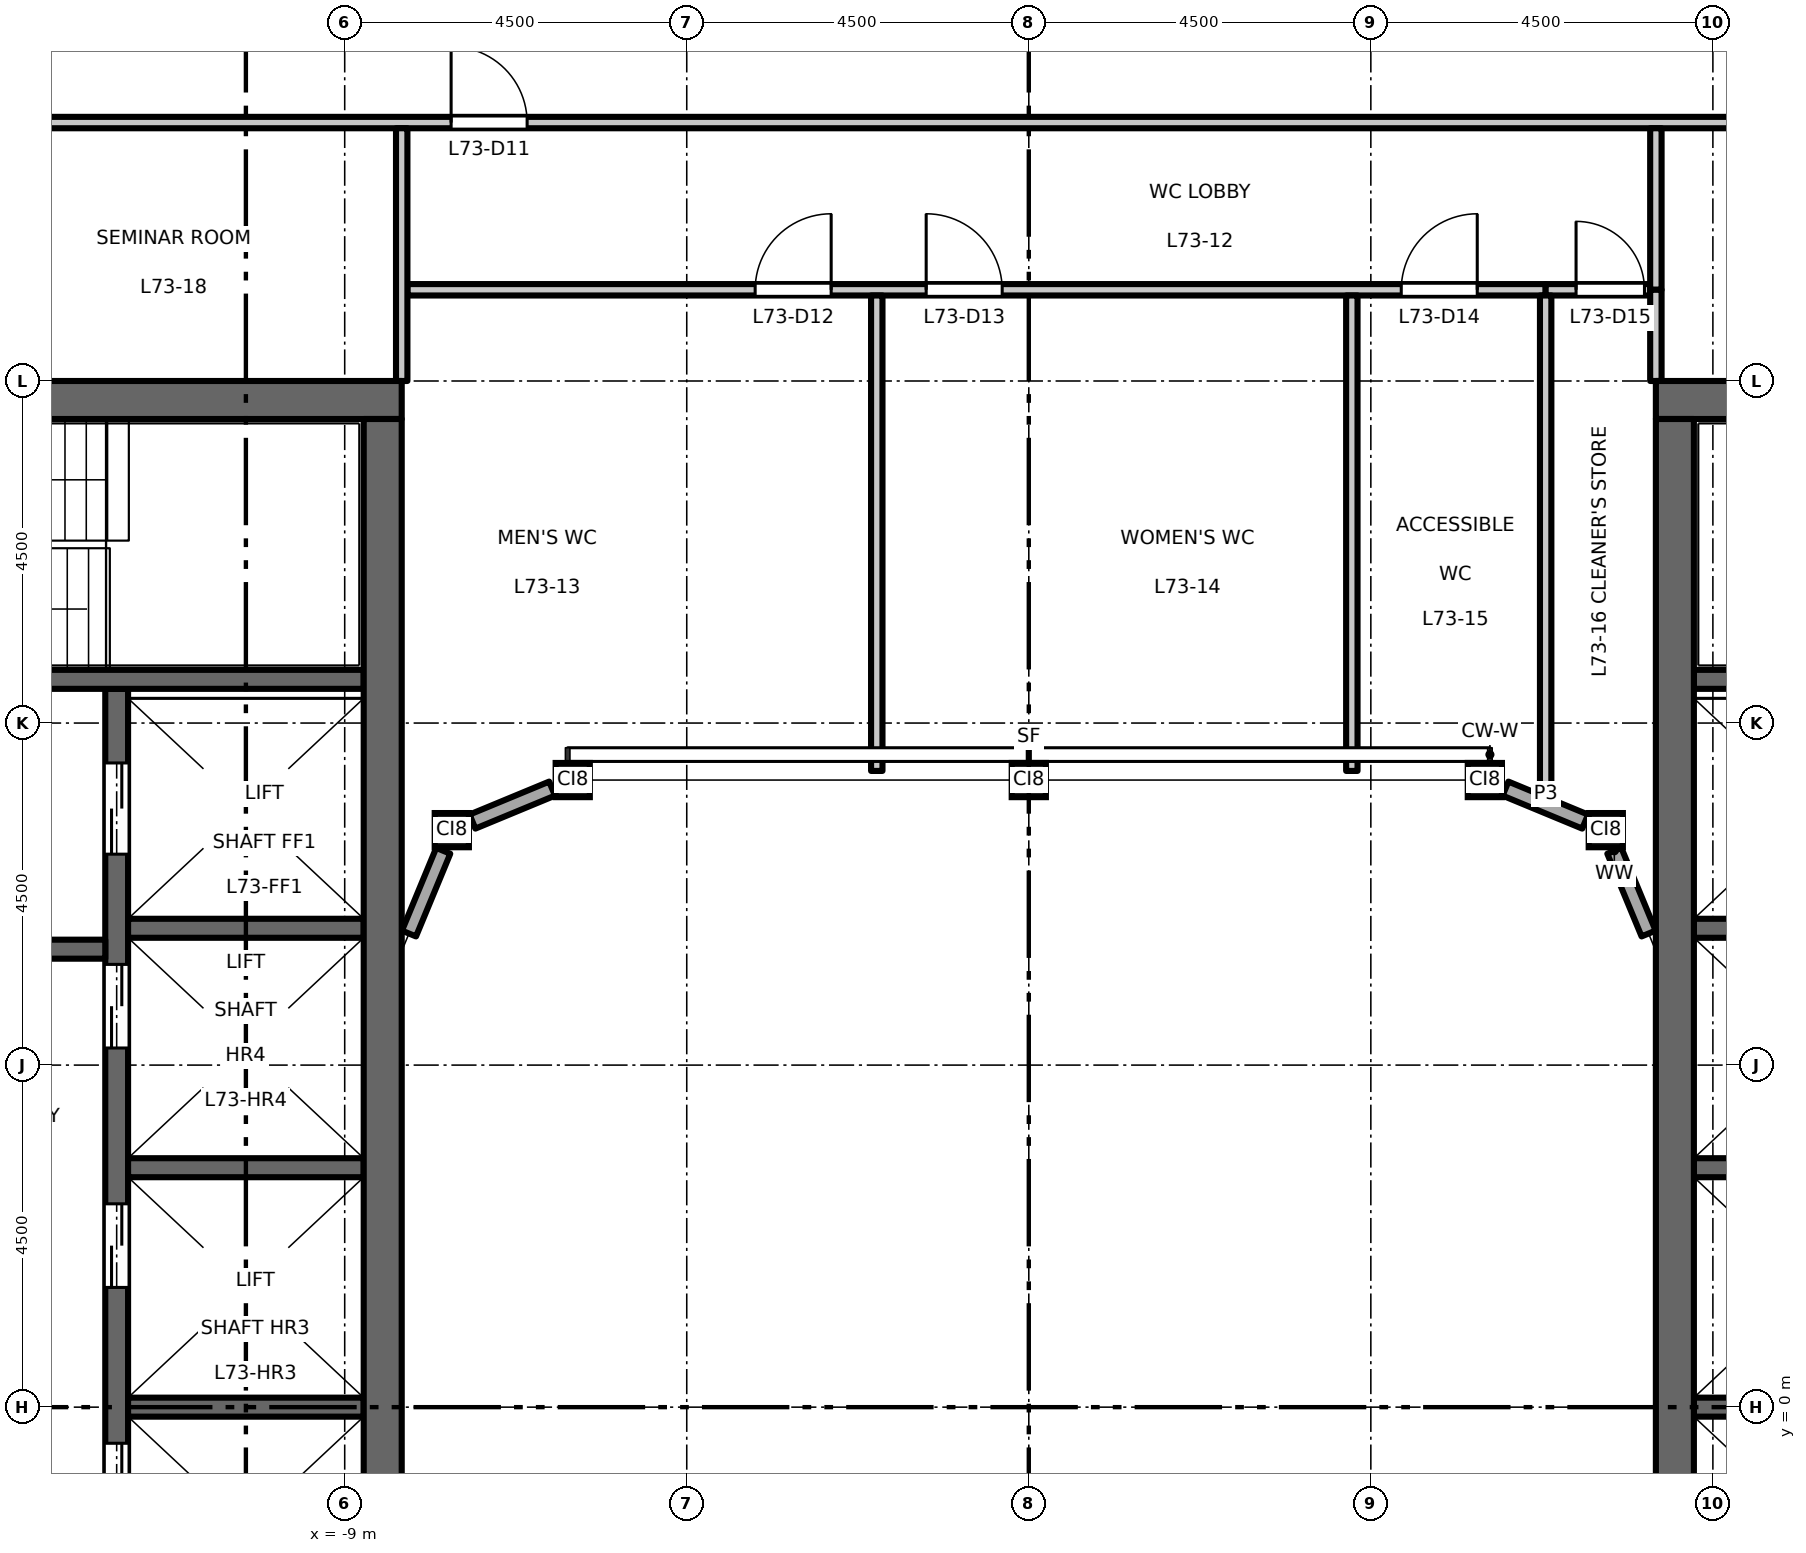
"""IFC4 building model, lengths in metres.
Left out: names, types, materials, properties, quantities, classifications, styles, units other than length and angle.
Written with IfcOpenShell. Run it as: python <this file> out.ifc"""

import sys

from ifc_helpers import new_model, si_unit, direction, frame, frame_2d, origin, origin_2d, place, context, subcontext, project, spatial, rectangle, hollow_rectangle, extrude, element, fill, save


model = new_model("IFC4")
c1 = context("Model", 3, precision=1e-05, world=origin(), true_north=direction((0.0, 1.0)))
c2 = subcontext(c1, "Body", "Model", "MODEL_VIEW")
j1 = project(units=[si_unit("LENGTHUNIT", "METRE"), si_unit("PLANEANGLEUNIT", "RADIAN")], contexts=[c1])
p1 = place(None, origin())
s1 = spatial("IfcSite", under=j1, at=p1, CompositionType="ELEMENT")
p2 = place(p1, origin())
s2 = spatial("IfcBuilding", under=s1, at=p2, CompositionType="ELEMENT")
p3 = place(p2, frame((0.0, 0.0, 339.2)))
s3 = spatial("IfcBuildingStorey", under=s2, at=p3, CompositionType="ELEMENT", Elevation=339.2)
for number, where, z_axis, x_axis in (
    (1, (-7.591, 7.591, 0.0), (0.0, 0.0, 1.0), (1.0, 0.0, 0.0)),
    (2, (-6.0, 8.25, 0.0), (0.0, 0.0, 1.0), (1.0, 0.0, 0.0)),
    (3, (0.0, 8.25, 0.0), (0.0, 0.0, 1.0), (1.0, 0.0, 0.0)),
    (4, (6.0, 8.25, 0.0), (0.0, 0.0, 1.0), (1.0, 0.0, 0.0)),
    (5, (7.591, 7.591, 0.0), (0.0, 0.0, 1.0), (1.0, 0.0, 0.0)),
):
    element("IfcColumn", number, at=place(p3, frame(where, z_axis=z_axis, x_axis=x_axis)), inside=s3, PredefinedType="COLUMN", context=c2, shape_type="SweptSolid", body=[
        extrude(hollow_rectangle(XDim=0.45, YDim=0.45, WallThickness=0.022, at=origin_2d()), origin(), (0.0, 0.0, 1.0), 4.5),
    ])
p4 = place(p3, frame((-12.0, -9.45, 0.0), z_axis=(0.0, 0.0, 1.0), x_axis=(0.0, 1.0, 0.0)))
e6 = element("IfcWall", 6, at=p4, inside=s3, PredefinedType="SHEAR", context=c2, shape_type="SweptSolid", body=[
    extrude(rectangle(XDim=18.9, YDim=0.3, at=frame_2d((9.45, 0.0))), origin(), (0.0, 0.0, 1.0), 4.35),
])
p5 = place(p4, frame((4.725, 0.0, 0.0)))
e7 = element("IfcOpeningElement", 7, at=p5, cuts=e6, PredefinedType="OPENING", context=c2, shape_type="SweptSolid", body=[
    extrude(rectangle(XDim=1.1, YDim=2.1, at=frame_2d((0.55, 1.05))), frame((0.0, 0.16, 0.0), z_axis=(0.0, -1.0, 0.0), x_axis=(1.0, 0.0, 0.0)), (0.0, 0.0, 1.0), 0.32),
])
p6 = place(p4, frame((7.875, 0.0, 0.0)))
e8 = element("IfcOpeningElement", 8, at=p6, cuts=e6, PredefinedType="OPENING", context=c2, shape_type="SweptSolid", body=[
    extrude(rectangle(XDim=1.1, YDim=2.1, at=frame_2d((0.55, 1.05))), frame((0.0, 0.16, 0.0), z_axis=(0.0, -1.0, 0.0), x_axis=(1.0, 0.0, 0.0)), (0.0, 0.0, 1.0), 0.32),
])
p7 = place(p4, frame((11.025, 0.0, 0.0)))
e9 = element("IfcOpeningElement", 9, at=p7, cuts=e6, PredefinedType="OPENING", context=c2, shape_type="SweptSolid", body=[
    extrude(rectangle(XDim=1.1, YDim=2.1, at=frame_2d((0.55, 1.05))), frame((0.0, 0.16, 0.0), z_axis=(0.0, -1.0, 0.0), x_axis=(1.0, 0.0, 0.0)), (0.0, 0.0, 1.0), 0.32),
])
p8 = place(p4, frame((14.175, 0.0, 0.0)))
e10 = element("IfcOpeningElement", 10, at=p8, cuts=e6, PredefinedType="OPENING", context=c2, shape_type="SweptSolid", body=[
    extrude(rectangle(XDim=1.1, YDim=2.1, at=frame_2d((0.55, 1.05))), frame((0.0, 0.16, 0.0), z_axis=(0.0, -1.0, 0.0), x_axis=(1.0, 0.0, 0.0)), (0.0, 0.0, 1.0), 0.32),
])
p9 = place(p4, frame((16.725, 0.0, 0.0)))
e11 = element("IfcOpeningElement", 11, at=p9, cuts=e6, PredefinedType="OPENING", context=c2, shape_type="SweptSolid", body=[
    extrude(rectangle(XDim=1.2, YDim=2.1, at=frame_2d((0.6, 1.05))), frame((0.0, 0.16, 0.0), z_axis=(0.0, -1.0, 0.0), x_axis=(1.0, 0.0, 0.0)), (0.0, 0.0, 1.0), 0.32),
])
p10 = place(p4, frame((0.975, 0.0, 0.0)))
e12 = element("IfcOpeningElement", 12, at=p10, cuts=e6, PredefinedType="OPENING", context=c2, shape_type="SweptSolid", body=[
    extrude(rectangle(XDim=1.2, YDim=2.1, at=frame_2d((0.6, 1.05))), frame((0.0, 0.16, 0.0), z_axis=(0.0, -1.0, 0.0), x_axis=(1.0, 0.0, 0.0)), (0.0, 0.0, 1.0), 0.32),
])
p11 = place(p3, frame((-12.15, 6.025, 0.0), z_axis=(0.0, 0.0, 1.0), x_axis=(-1.0, 0.0, 0.0)))
e13 = element("IfcWall", 13, at=p11, inside=s3, PredefinedType="SHEAR", context=c2, shape_type="SweptSolid", body=[
    extrude(rectangle(XDim=4.6, YDim=0.25, at=frame_2d((2.3, 0.0))), origin(), (0.0, 0.0, 1.0), 4.35),
])
p12 = place(p11, frame((1.8, 0.0, 0.0)))
e14 = element("IfcOpeningElement", 14, at=p12, cuts=e13, PredefinedType="OPENING", context=c2, shape_type="SweptSolid", body=[
    extrude(rectangle(XDim=1.0, YDim=2.1, at=frame_2d((0.5, 1.05))), frame((0.0, 0.135, 0.0), z_axis=(0.0, -1.0, 0.0), x_axis=(1.0, 0.0, 0.0)), (0.0, 0.0, 1.0), 0.27),
])
for number, where, z_axis, x_axis in (
    (15, (-8.75, 0.0, 0.0), (0.0, 0.0, 1.0), (-1.0, 0.0, 0.0)),
    (16, (-8.75, 3.15, 0.0), (0.0, 0.0, 1.0), (-1.0, 0.0, 0.0)),
    (17, (-8.75, 6.3, 0.0), (0.0, 0.0, 1.0), (-1.0, 0.0, 0.0)),
):
    element("IfcWall", number, at=place(p3, frame(where, z_axis=z_axis, x_axis=x_axis)), inside=s3, PredefinedType="SHEAR", context=c2, shape_type="SweptSolid", body=[
        extrude(rectangle(XDim=3.1, YDim=0.25, at=frame_2d((1.55, 0.0))), origin(), (0.0, 0.0, 1.0), 4.35),
    ])
p13 = place(p3, frame((-8.75, 9.575, 0.0), z_axis=(0.0, 0.0, 1.0), x_axis=(-1.0, 0.0, 0.0)))
e18 = element("IfcWall", 18, at=p13, inside=s3, PredefinedType="SHEAR", context=c2, shape_type="SweptSolid", body=[
    extrude(rectangle(XDim=8.0, YDim=0.25, at=frame_2d((4.0, 0.0))), origin(), (0.0, 0.0, 1.0), 4.35),
])
p14 = place(p13, frame((6.65, 0.0, 0.0)))
e19 = element("IfcOpeningElement", 19, at=p14, cuts=e18, PredefinedType="OPENING", context=c2, shape_type="SweptSolid", body=[
    extrude(rectangle(XDim=1.1, YDim=2.1, at=frame_2d((0.55, 1.05))), frame((0.0, 0.135, 0.0), z_axis=(0.0, -1.0, 0.0), x_axis=(1.0, 0.0, 0.0)), (0.0, 0.0, 1.0), 0.27),
])
p15 = place(p3, frame((-8.25, 13.25, 0.0), z_axis=(0.0, 0.0, 1.0), x_axis=(-1.0, 0.0, 0.0)))
e20 = element("IfcWall", 20, at=p15, inside=s3, PredefinedType="SHEAR", context=c2, shape_type="SweptSolid", body=[
    extrude(rectangle(XDim=9.0, YDim=0.5, at=frame_2d((4.5, 0.0))), origin(), (0.0, 0.0, 1.0), 4.35),
])
p16 = place(p3, frame((-8.5, -13.0, 0.0), z_axis=(0.0, 0.0, 1.0), x_axis=(0.0, 1.0, 0.0)))
e21 = element("IfcWall", 21, at=p16, inside=s3, PredefinedType="SHEAR", context=c2, shape_type="SweptSolid", body=[
    extrude(rectangle(XDim=26.0, YDim=0.5, at=frame_2d((13.0, 0.0))), origin(), (0.0, 0.0, 1.0), 4.35),
])
for number, where, z_axis, x_axis in (
    (22, (8.75, 0.0, 0.0), (0.0, 0.0, 1.0), (1.0, 0.0, 0.0)),
    (23, (8.75, 3.15, 0.0), (0.0, 0.0, 1.0), (1.0, 0.0, 0.0)),
    (24, (8.75, 6.3, 0.0), (0.0, 0.0, 1.0), (1.0, 0.0, 0.0)),
):
    element("IfcWall", number, at=place(p3, frame(where, z_axis=z_axis, x_axis=x_axis)), inside=s3, PredefinedType="SHEAR", context=c2, shape_type="SweptSolid", body=[
        extrude(rectangle(XDim=3.1, YDim=0.25, at=frame_2d((1.55, 0.0))), origin(), (0.0, 0.0, 1.0), 4.35),
    ])
p17 = place(p3, frame((8.75, 9.575, 0.0), z_axis=(0.0, 0.0, 1.0), x_axis=(1.0, 0.0, 0.0)))
e25 = element("IfcWall", 25, at=p17, inside=s3, PredefinedType="SHEAR", context=c2, shape_type="SweptSolid", body=[
    extrude(rectangle(XDim=8.0, YDim=0.25, at=frame_2d((4.0, 0.0))), origin(), (0.0, 0.0, 1.0), 4.35),
])
p18 = place(p17, frame((6.65, 0.0, 0.0)))
e26 = element("IfcOpeningElement", 26, at=p18, cuts=e25, PredefinedType="OPENING", context=c2, shape_type="SweptSolid", body=[
    extrude(rectangle(XDim=1.1, YDim=2.1, at=frame_2d((0.55, 1.05))), frame((0.0, 0.135, 0.0), z_axis=(0.0, -1.0, 0.0), x_axis=(1.0, 0.0, 0.0)), (0.0, 0.0, 1.0), 0.27),
])
p19 = place(p3, frame((8.25, 13.25, 0.0), z_axis=(0.0, 0.0, 1.0), x_axis=(1.0, 0.0, 0.0)))
e27 = element("IfcWall", 27, at=p19, inside=s3, PredefinedType="SHEAR", context=c2, shape_type="SweptSolid", body=[
    extrude(rectangle(XDim=9.0, YDim=0.5, at=frame_2d((4.5, 0.0))), origin(), (0.0, 0.0, 1.0), 4.35),
])
p20 = place(p3, frame((8.5, -13.0, 0.0), z_axis=(0.0, 0.0, 1.0), x_axis=(0.0, 1.0, 0.0)))
e28 = element("IfcWall", 28, at=p20, inside=s3, PredefinedType="SHEAR", context=c2, shape_type="SweptSolid", body=[
    extrude(rectangle(XDim=26.0, YDim=0.5, at=frame_2d((13.0, 0.0))), origin(), (0.0, 0.0, 1.0), 4.35),
])
p21 = place(p3, frame((8.154, 6.231, 0.0), z_axis=(0.0, 0.0, 1.0), x_axis=(-0.382760542083, 0.92384758885, 0.0)))
e29 = element("IfcWall", 29, at=p21, inside=s3, PredefinedType="STANDARD", context=c2, shape_type="SweptSolid", body=[
    extrude(rectangle(XDim=1.178, YDim=0.2, at=frame_2d((0.589, 0.0))), origin(), (0.0, 0.0, 1.0), 4.01),
])
for number, where, z_axis, x_axis in (
    (30, (7.319, 7.703, 0.0), (0.0, 0.0, 1.0), (-0.924, 0.383, 0.0)),
    (31, (-6.271, 8.137, 0.0), (0.0, 0.0, 1.0), (-0.924, -0.383, 0.0)),
):
    element("IfcWall", number, at=place(p3, frame(where, z_axis=z_axis, x_axis=x_axis)), inside=s3, PredefinedType="STANDARD", context=c2, shape_type="SweptSolid", body=[
        extrude(rectangle(XDim=1.134, YDim=0.2, at=frame_2d((0.567, 0.0))), origin(), (0.0, 0.0, 1.0), 4.01),
    ])
p22 = place(p3, frame((-7.703, 7.319, 0.0), z_axis=(0.0, 0.0, 1.0), x_axis=(-0.382760542083, -0.92384758885, 0.0)))
e32 = element("IfcWall", 32, at=p22, inside=s3, PredefinedType="STANDARD", context=c2, shape_type="SweptSolid", body=[
    extrude(rectangle(XDim=1.178, YDim=0.2, at=frame_2d((0.589, 0.0))), origin(), (0.0, 0.0, 1.0), 4.01),
])
p23 = place(p3, frame((-8.175, 14.7, 0.0), z_axis=(0.0, 0.0, 1.0), x_axis=(1.0, 0.0, 0.0)))
e33 = element("IfcWall", 33, at=p23, inside=s3, PredefinedType="PARTITIONING", context=c2, shape_type="SweptSolid", body=[
    extrude(rectangle(XDim=14.975, YDim=0.15, at=frame_2d((7.488, 0.0))), origin(), (0.0, 0.0, 1.0), 4.35),
])
p24 = place(p23, frame((4.575, 0.0, 0.0)))
e34 = element("IfcOpeningElement", 34, at=p24, cuts=e33, PredefinedType="OPENING", context=c2, shape_type="SweptSolid", body=[
    extrude(rectangle(XDim=1.0, YDim=2.1, at=frame_2d((0.5, 1.05))), frame((0.0, 0.085, 0.0), z_axis=(0.0, -1.0, 0.0), x_axis=(1.0, 0.0, 0.0)), (0.0, 0.0, 1.0), 0.17),
])
p25 = place(p23, frame((6.825, 0.0, 0.0)))
e35 = element("IfcOpeningElement", 35, at=p25, cuts=e33, PredefinedType="OPENING", context=c2, shape_type="SweptSolid", body=[
    extrude(rectangle(XDim=1.0, YDim=2.1, at=frame_2d((0.5, 1.05))), frame((0.0, 0.085, 0.0), z_axis=(0.0, -1.0, 0.0), x_axis=(1.0, 0.0, 0.0)), (0.0, 0.0, 1.0), 0.17),
])
p26 = place(p23, frame((13.075, 0.0, 0.0)))
e36 = element("IfcOpeningElement", 36, at=p26, cuts=e33, PredefinedType="OPENING", context=c2, shape_type="SweptSolid", body=[
    extrude(rectangle(XDim=1.0, YDim=2.1, at=frame_2d((0.5, 1.05))), frame((0.0, 0.085, 0.0), z_axis=(0.0, -1.0, 0.0), x_axis=(1.0, 0.0, 0.0)), (0.0, 0.0, 1.0), 0.17),
])
p27 = place(p3, frame((6.8, 14.7, 0.0), z_axis=(0.0, 0.0, 1.0), x_axis=(1.0, 0.0, 0.0)))
e37 = element("IfcWall", 37, at=p27, inside=s3, PredefinedType="PARTITIONING", context=c2, shape_type="SweptSolid", body=[
    extrude(rectangle(XDim=1.375, YDim=0.15, at=frame_2d((0.688, 0.0))), origin(), (0.0, 0.0, 1.0), 4.35),
])
p28 = place(p27, frame((0.4, 0.0, 0.0)))
e38 = element("IfcOpeningElement", 38, at=p28, cuts=e37, PredefinedType="OPENING", context=c2, shape_type="SweptSolid", body=[
    extrude(rectangle(XDim=0.9, YDim=2.1, at=frame_2d((0.45, 1.05))), frame((0.0, 0.085, 0.0), z_axis=(0.0, -1.0, 0.0), x_axis=(1.0, 0.0, 0.0)), (0.0, 0.0, 1.0), 0.17),
])
p29 = place(p3, frame((-17.325, 16.9, 0.0), z_axis=(0.0, 0.0, 1.0), x_axis=(1.0, 0.0, 0.0)))
e39 = element("IfcWall", 39, at=p29, inside=s3, PredefinedType="PARTITIONING", context=c2, shape_type="SweptSolid", body=[
    extrude(rectangle(XDim=34.65, YDim=0.15, at=frame_2d((17.325, 0.0))), origin(), (0.0, 0.0, 1.0), 4.35),
])
p30 = place(p29, frame((9.725, 0.0, 0.0)))
e40 = element("IfcOpeningElement", 40, at=p30, cuts=e39, PredefinedType="OPENING", context=c2, shape_type="SweptSolid", body=[
    extrude(rectangle(XDim=1.0, YDim=2.1, at=frame_2d((0.5, 1.05))), frame((0.0, 0.085, 0.0), z_axis=(0.0, -1.0, 0.0), x_axis=(1.0, 0.0, 0.0)), (0.0, 0.0, 1.0), 0.17),
])
p31 = place(p29, frame((0.725, 0.0, 0.0)))
e41 = element("IfcOpeningElement", 41, at=p31, cuts=e39, PredefinedType="OPENING", context=c2, shape_type="SweptSolid", body=[
    extrude(rectangle(XDim=1.0, YDim=2.1, at=frame_2d((0.5, 1.05))), frame((0.0, 0.085, 0.0), z_axis=(0.0, -1.0, 0.0), x_axis=(1.0, 0.0, 0.0)), (0.0, 0.0, 1.0), 0.17),
])
p32 = place(p29, frame((32.975, 0.0, 0.0)))
e42 = element("IfcOpeningElement", 42, at=p32, cuts=e39, PredefinedType="OPENING", context=c2, shape_type="SweptSolid", body=[
    extrude(rectangle(XDim=1.0, YDim=2.1, at=frame_2d((0.5, 1.05))), frame((0.0, 0.085, 0.0), z_axis=(0.0, -1.0, 0.0), x_axis=(1.0, 0.0, 0.0)), (0.0, 0.0, 1.0), 0.17),
])
p33 = place(p3, frame((-8.25, 13.5, 0.0), z_axis=(0.0, 0.0, 1.0), x_axis=(0.0, 1.0, 0.0)))
e43 = element("IfcWall", 43, at=p33, inside=s3, PredefinedType="PARTITIONING", context=c2, shape_type="SweptSolid", body=[
    extrude(rectangle(XDim=3.325, YDim=0.15, at=frame_2d((1.663, 0.0))), origin(), (0.0, 0.0, 1.0), 4.35),
])
for number, where, z_axis, x_axis in (
    (44, (-2.0, 8.37, 0.0), (0.0, 0.0, 1.0), (0.0, 1.0, 0.0)),
    (45, (4.25, 8.37, 0.0), (0.0, 0.0, 1.0), (0.0, 1.0, 0.0)),
):
    element("IfcWall", number, at=place(p3, frame(where, z_axis=z_axis, x_axis=x_axis)), inside=s3, PredefinedType="PARTITIONING", context=c2, shape_type="SweptSolid", body=[
        extrude(rectangle(XDim=6.255, YDim=0.15, at=frame_2d((3.127, 0.0))), origin(), (0.0, 0.0, 1.0), 4.35),
    ])
p34 = place(p3, frame((6.8, 8.069, 0.0), z_axis=(0.0, 0.0, 1.0), x_axis=(0.0, 1.0, 0.0)))
e46 = element("IfcWall", 46, at=p34, inside=s3, PredefinedType="PARTITIONING", context=c2, shape_type="SweptSolid", body=[
    extrude(rectangle(XDim=6.556, YDim=0.15, at=frame_2d((3.278, 0.0))), origin(), (0.0, 0.0, 1.0), 4.35),
])
p35 = place(p3, frame((8.25, 14.7, 0.0), z_axis=(0.0, 0.0, 1.0), x_axis=(0.0, 1.0, 0.0)))
e47 = element("IfcWall", 47, at=p35, inside=s3, PredefinedType="PARTITIONING", context=c2, shape_type="SweptSolid", body=[
    extrude(rectangle(XDim=2.125, YDim=0.15, at=frame_2d((1.062, 0.0))), origin(), (0.0, 0.0, 1.0), 4.35),
])
p36 = place(p3, frame((8.25, 13.5, 0.0), z_axis=(0.0, 0.0, 1.0), x_axis=(0.0, 1.0, 0.0)))
e48 = element("IfcWall", 48, at=p36, inside=s3, PredefinedType="PARTITIONING", context=c2, shape_type="SweptSolid", body=[
    extrude(rectangle(XDim=1.2, YDim=0.15, at=frame_2d((0.6, 0.0))), origin(), (0.0, 0.0, 1.0), 4.35),
])
p37 = place(p6, origin())
e49 = element("IfcDoor", 49, at=p37, inside=s3, OperationType="DOUBLE_DOOR_SLIDING", PredefinedType="DOOR", context=c2, shape_type="SweptSolid", body=[
    extrude(rectangle(XDim=1.1, YDim=2.1, at=frame_2d((0.55, 1.05))), frame((0.0, 0.025, 0.0), z_axis=(0.0, -1.0, 0.0), x_axis=(1.0, 0.0, 0.0)), (0.0, 0.0, 1.0), 0.05),
])
fill(e8, e49)
p38 = place(p7, origin())
e50 = element("IfcDoor", 50, at=p38, inside=s3, OperationType="DOUBLE_DOOR_SLIDING", PredefinedType="DOOR", context=c2, shape_type="SweptSolid", body=[
    extrude(rectangle(XDim=1.1, YDim=2.1, at=frame_2d((0.55, 1.05))), frame((0.0, 0.025, 0.0), z_axis=(0.0, -1.0, 0.0), x_axis=(1.0, 0.0, 0.0)), (0.0, 0.0, 1.0), 0.05),
])
fill(e9, e50)
p39 = place(p8, origin())
e51 = element("IfcDoor", 51, at=p39, inside=s3, OperationType="DOUBLE_DOOR_SLIDING", PredefinedType="DOOR", context=c2, shape_type="SweptSolid", body=[
    extrude(rectangle(XDim=1.1, YDim=2.1, at=frame_2d((0.55, 1.05))), frame((0.0, 0.025, 0.0), z_axis=(0.0, -1.0, 0.0), x_axis=(1.0, 0.0, 0.0)), (0.0, 0.0, 1.0), 0.05),
])
fill(e10, e51)
p40 = place(p9, origin())
e52 = element("IfcDoor", 52, at=p40, inside=s3, OperationType="DOUBLE_DOOR_SLIDING", PredefinedType="DOOR", context=c2, shape_type="SweptSolid", body=[
    extrude(rectangle(XDim=1.2, YDim=2.1, at=frame_2d((0.6, 1.05))), frame((0.0, 0.025, 0.0), z_axis=(0.0, -1.0, 0.0), x_axis=(1.0, 0.0, 0.0)), (0.0, 0.0, 1.0), 0.05),
])
fill(e11, e52)
p41 = place(p30, origin())
e53 = element("IfcDoor", 53, at=p41, inside=s3, OperationType="SINGLE_SWING_LEFT", PredefinedType="DOOR", context=c2, shape_type="SweptSolid", body=[
    extrude(rectangle(XDim=1.0, YDim=2.1, at=frame_2d((0.5, 1.05))), frame((0.0, 0.025, 0.0), z_axis=(0.0, -1.0, 0.0), x_axis=(1.0, 0.0, 0.0)), (0.0, 0.0, 1.0), 0.05),
])
fill(e40, e53)
p42 = place(p24, origin())
e54 = element("IfcDoor", 54, at=p42, inside=s3, OperationType="SINGLE_SWING_RIGHT", PredefinedType="DOOR", context=c2, shape_type="SweptSolid", body=[
    extrude(rectangle(XDim=1.0, YDim=2.1, at=frame_2d((0.5, 1.05))), frame((0.0, 0.025, 0.0), z_axis=(0.0, -1.0, 0.0), x_axis=(1.0, 0.0, 0.0)), (0.0, 0.0, 1.0), 0.05),
])
fill(e34, e54)
p43 = place(p25, origin())
e55 = element("IfcDoor", 55, at=p43, inside=s3, OperationType="SINGLE_SWING_LEFT", PredefinedType="DOOR", context=c2, shape_type="SweptSolid", body=[
    extrude(rectangle(XDim=1.0, YDim=2.1, at=frame_2d((0.5, 1.05))), frame((0.0, 0.025, 0.0), z_axis=(0.0, -1.0, 0.0), x_axis=(1.0, 0.0, 0.0)), (0.0, 0.0, 1.0), 0.05),
])
fill(e35, e55)
p44 = place(p26, origin())
e56 = element("IfcDoor", 56, at=p44, inside=s3, OperationType="SINGLE_SWING_RIGHT", PredefinedType="DOOR", context=c2, shape_type="SweptSolid", body=[
    extrude(rectangle(XDim=1.0, YDim=2.1, at=frame_2d((0.5, 1.05))), frame((0.0, 0.025, 0.0), z_axis=(0.0, -1.0, 0.0), x_axis=(1.0, 0.0, 0.0)), (0.0, 0.0, 1.0), 0.05),
])
fill(e36, e56)
p45 = place(p28, origin())
e57 = element("IfcDoor", 57, at=p45, inside=s3, OperationType="SINGLE_SWING_LEFT", PredefinedType="DOOR", context=c2, shape_type="SweptSolid", body=[
    extrude(rectangle(XDim=0.9, YDim=2.1, at=frame_2d((0.45, 1.05))), frame((0.0, 0.025, 0.0), z_axis=(0.0, -1.0, 0.0), x_axis=(1.0, 0.0, 0.0)), (0.0, 0.0, 1.0), 0.05),
])
fill(e38, e57)
save(model, sys.argv[1])
